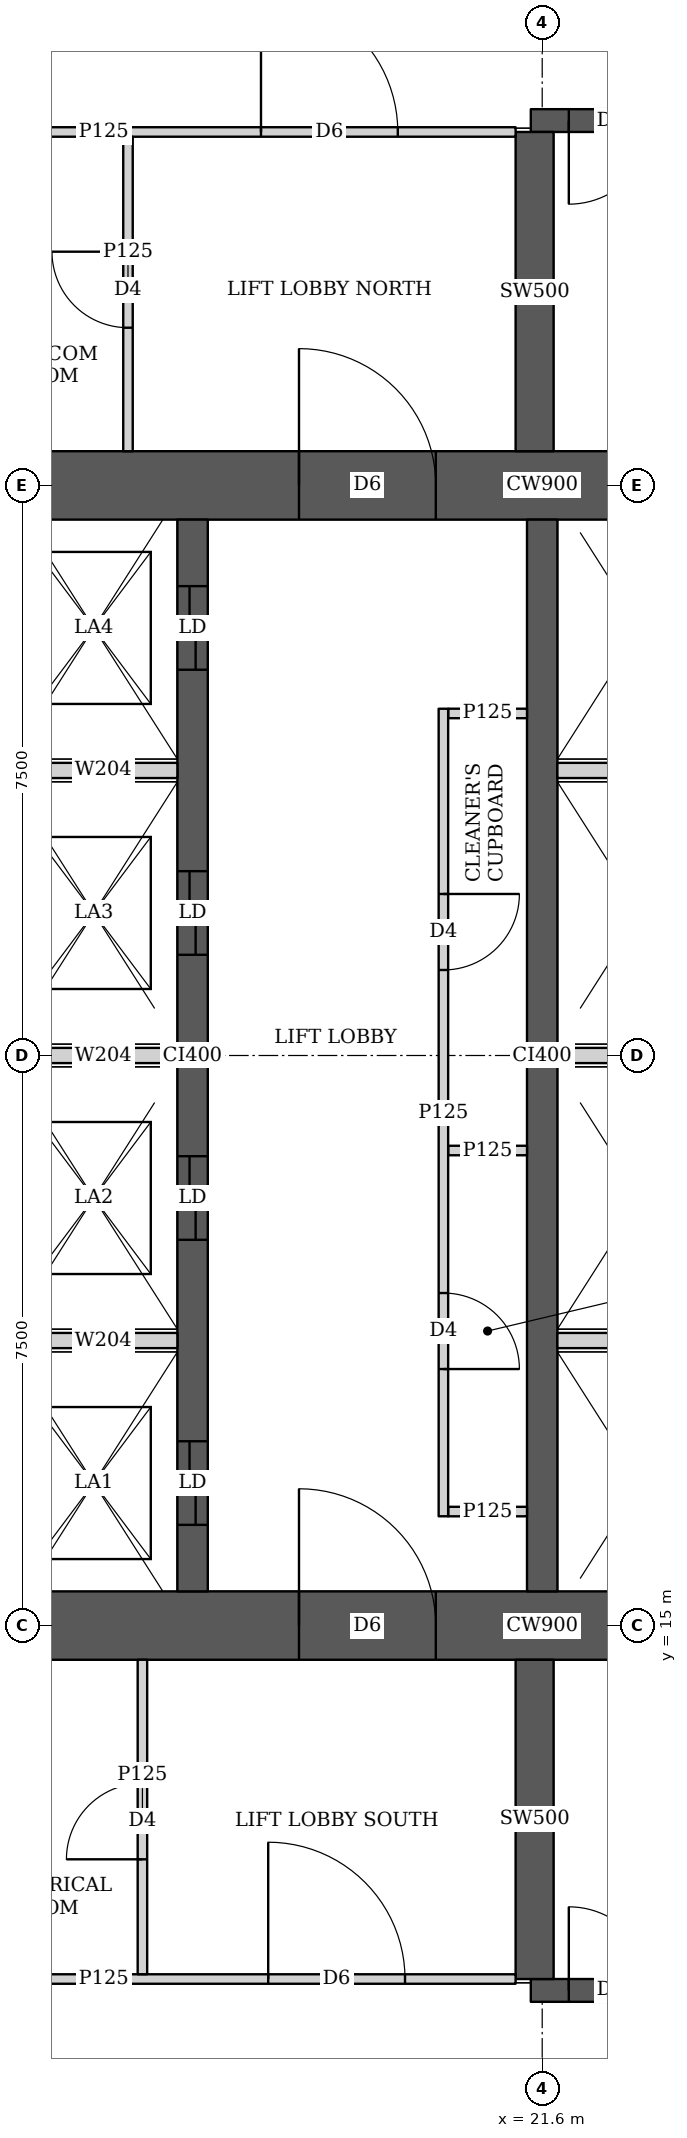
"""IFC4 building model, lengths in metres.
Left out: names, types, materials, properties, quantities, classifications, styles, units other than length and angle.
Written with IfcOpenShell. Run it as: python <this file> out.ifc"""

import sys

from ifc_helpers import new_model, si_unit, direction, frame, frame_2d, origin, place, context, subcontext, project, spatial, rectangle, extrude, element, fill, save


model = new_model("IFC4")
c1 = context("Model", 3, precision=1e-05, world=origin(), true_north=direction((0.0, 1.0)))
c2 = subcontext(c1, "Body", "Model", "MODEL_VIEW")
j1 = project(units=[si_unit("LENGTHUNIT", "METRE"), si_unit("PLANEANGLEUNIT", "RADIAN")], contexts=[c1])
p1 = place(None, origin())
s1 = spatial("IfcSite", under=j1, at=p1, CompositionType="ELEMENT")
p2 = place(p1, origin())
s2 = spatial("IfcBuilding", under=s1, at=p2, CompositionType="ELEMENT")
p3 = place(p2, frame((0.0, 0.0, 42.5)))
s3 = spatial("IfcBuildingStorey", under=s2, at=p3, CompositionType="ELEMENT", Elevation=42.5)
p4 = place(p3, frame((13.95, 15.0, 0.0), z_axis=(0.0, 0.0, 1.0), x_axis=(1.0, 0.0, 0.0)))
e1 = element("IfcWall", 1, at=p4, inside=s3, PredefinedType="SHEAR", context=c2, shape_type="SweptSolid", body=[
    extrude(rectangle(XDim=15.3, YDim=0.9, at=frame_2d((7.65, 0.0))), origin(), (0.0, 0.0, 1.0), 3.75),
])
p5 = place(p4, frame((4.45, 0.0, 0.0)))
e2 = element("IfcOpeningElement", 2, at=p5, cuts=e1, PredefinedType="OPENING", context=c2, shape_type="SweptSolid", body=[
    extrude(rectangle(XDim=1.8, YDim=2.1, at=frame_2d((0.9, 1.05))), frame((0.0, 0.46, 0.0), z_axis=(0.0, -1.0, 0.0), x_axis=(1.0, 0.0, 0.0)), (0.0, 0.0, 1.0), 0.92),
])
p6 = place(p4, frame((10.7, 0.0, 0.0)))
e3 = element("IfcOpeningElement", 3, at=p6, cuts=e1, PredefinedType="OPENING", context=c2, shape_type="SweptSolid", body=[
    extrude(rectangle(XDim=1.1, YDim=2.1, at=frame_2d((0.55, 1.05))), frame((0.0, 0.46, 0.0), z_axis=(0.0, -1.0, 0.0), x_axis=(1.0, 0.0, 0.0)), (0.0, 0.0, 1.0), 0.92),
])
p7 = place(p3, frame((13.95, 30.0, 0.0), z_axis=(0.0, 0.0, 1.0), x_axis=(1.0, 0.0, 0.0)))
e4 = element("IfcWall", 4, at=p7, inside=s3, PredefinedType="SHEAR", context=c2, shape_type="SweptSolid", body=[
    extrude(rectangle(XDim=15.3, YDim=0.9, at=frame_2d((7.65, 0.0))), origin(), (0.0, 0.0, 1.0), 3.75),
])
p8 = place(p7, frame((4.45, 0.0, 0.0)))
e5 = element("IfcOpeningElement", 5, at=p8, cuts=e4, PredefinedType="OPENING", context=c2, shape_type="SweptSolid", body=[
    extrude(rectangle(XDim=1.8, YDim=2.1, at=frame_2d((0.9, 1.05))), frame((0.0, 0.46, 0.0), z_axis=(0.0, -1.0, 0.0), x_axis=(1.0, 0.0, 0.0)), (0.0, 0.0, 1.0), 0.92),
])
p9 = place(p7, frame((10.7, 0.0, 0.0)))
e6 = element("IfcOpeningElement", 6, at=p9, cuts=e4, PredefinedType="OPENING", context=c2, shape_type="SweptSolid", body=[
    extrude(rectangle(XDim=1.1, YDim=2.1, at=frame_2d((0.55, 1.05))), frame((0.0, 0.46, 0.0), z_axis=(0.0, -1.0, 0.0), x_axis=(1.0, 0.0, 0.0)), (0.0, 0.0, 1.0), 0.92),
])
p10 = place(p3, frame((17.0, 15.45, 0.0), z_axis=(0.0, 0.0, 1.0), x_axis=(0.0, 1.0, 0.0)))
e7 = element("IfcWall", 7, at=p10, inside=s3, PredefinedType="SHEAR", context=c2, shape_type="SweptSolid", body=[
    extrude(rectangle(XDim=14.1, YDim=0.4, at=frame_2d((7.05, 0.0))), origin(), (0.0, 0.0, 1.0), 3.75),
])
p11 = place(p10, frame((0.875, 0.0, 0.0)))
e8 = element("IfcOpeningElement", 8, at=p11, cuts=e7, PredefinedType="OPENING", context=c2, shape_type="SweptSolid", body=[
    extrude(rectangle(XDim=1.1, YDim=2.1, at=frame_2d((0.55, 1.05))), frame((0.0, 0.21, 0.0), z_axis=(0.0, -1.0, 0.0), x_axis=(1.0, 0.0, 0.0)), (0.0, 0.0, 1.0), 0.42),
])
p12 = place(p10, frame((4.625, 0.0, 0.0)))
e9 = element("IfcOpeningElement", 9, at=p12, cuts=e7, PredefinedType="OPENING", context=c2, shape_type="SweptSolid", body=[
    extrude(rectangle(XDim=1.1, YDim=2.1, at=frame_2d((0.55, 1.05))), frame((0.0, 0.21, 0.0), z_axis=(0.0, -1.0, 0.0), x_axis=(1.0, 0.0, 0.0)), (0.0, 0.0, 1.0), 0.42),
])
p13 = place(p10, frame((8.375, 0.0, 0.0)))
e10 = element("IfcOpeningElement", 10, at=p13, cuts=e7, PredefinedType="OPENING", context=c2, shape_type="SweptSolid", body=[
    extrude(rectangle(XDim=1.1, YDim=2.1, at=frame_2d((0.55, 1.05))), frame((0.0, 0.21, 0.0), z_axis=(0.0, -1.0, 0.0), x_axis=(1.0, 0.0, 0.0)), (0.0, 0.0, 1.0), 0.42),
])
p14 = place(p10, frame((12.125, 0.0, 0.0)))
e11 = element("IfcOpeningElement", 11, at=p14, cuts=e7, PredefinedType="OPENING", context=c2, shape_type="SweptSolid", body=[
    extrude(rectangle(XDim=1.1, YDim=2.1, at=frame_2d((0.55, 1.05))), frame((0.0, 0.21, 0.0), z_axis=(0.0, -1.0, 0.0), x_axis=(1.0, 0.0, 0.0)), (0.0, 0.0, 1.0), 0.42),
])
p15 = place(p3, frame((21.6, 15.45, 0.0), z_axis=(0.0, 0.0, 1.0), x_axis=(0.0, 1.0, 0.0)))
e12 = element("IfcWall", 12, at=p15, inside=s3, PredefinedType="SHEAR", context=c2, shape_type="SweptSolid", body=[
    extrude(rectangle(XDim=14.1, YDim=0.4, at=frame_2d((7.05, 0.0))), origin(), (0.0, 0.0, 1.0), 3.75),
])
p16 = place(p3, frame((21.45, 10.2, 0.0), z_axis=(0.0, 0.0, 1.0), x_axis=(1.0, 0.0, 0.0)))
e13 = element("IfcWall", 13, at=p16, inside=s3, PredefinedType="SHEAR", context=c2, shape_type="SweptSolid", body=[
    extrude(rectangle(XDim=7.5, YDim=0.3, at=frame_2d((3.75, 0.0))), origin(), (0.0, 0.0, 1.0), 3.75),
])
p17 = place(p16, frame((0.5, 0.0, 0.0)))
e14 = element("IfcOpeningElement", 14, at=p17, cuts=e13, PredefinedType="OPENING", context=c2, shape_type="SweptSolid", body=[
    extrude(rectangle(XDim=1.1, YDim=2.1, at=frame_2d((0.55, 1.05))), frame((0.0, 0.16, 0.0), z_axis=(0.0, -1.0, 0.0), x_axis=(1.0, 0.0, 0.0)), (0.0, 0.0, 1.0), 0.32),
])
p18 = place(p3, frame((21.5, 10.35, 0.0), z_axis=(0.0, 0.0, 1.0), x_axis=(0.0, 1.0, 0.0)))
e15 = element("IfcWall", 15, at=p18, inside=s3, PredefinedType="SHEAR", context=c2, shape_type="SweptSolid", body=[
    extrude(rectangle(XDim=4.2, YDim=0.5, at=frame_2d((2.1, 0.0))), origin(), (0.0, 0.0, 1.0), 3.75),
])
p19 = place(p3, frame((21.45, 34.8, 0.0), z_axis=(0.0, 0.0, 1.0), x_axis=(1.0, 0.0, 0.0)))
e16 = element("IfcWall", 16, at=p19, inside=s3, PredefinedType="SHEAR", context=c2, shape_type="SweptSolid", body=[
    extrude(rectangle(XDim=7.5, YDim=0.3, at=frame_2d((3.75, 0.0))), origin(), (0.0, 0.0, 1.0), 3.75),
])
p20 = place(p19, frame((0.5, 0.0, 0.0)))
e17 = element("IfcOpeningElement", 17, at=p20, cuts=e16, PredefinedType="OPENING", context=c2, shape_type="SweptSolid", body=[
    extrude(rectangle(XDim=1.1, YDim=2.1, at=frame_2d((0.55, 1.05))), frame((0.0, 0.16, 0.0), z_axis=(0.0, -1.0, 0.0), x_axis=(1.0, 0.0, 0.0)), (0.0, 0.0, 1.0), 0.32),
])
p21 = place(p3, frame((21.5, 30.45, 0.0), z_axis=(0.0, 0.0, 1.0), x_axis=(0.0, 1.0, 0.0)))
e18 = element("IfcWall", 18, at=p21, inside=s3, PredefinedType="SHEAR", context=c2, shape_type="SweptSolid", body=[
    extrude(rectangle(XDim=4.2, YDim=0.5, at=frame_2d((2.1, 0.0))), origin(), (0.0, 0.0, 1.0), 3.75),
])
p22 = place(p3, frame((10.413, 10.35, 0.0), z_axis=(0.0, 0.0, 1.0), x_axis=(1.0, 0.0, 0.0)))
e19 = element("IfcWall", 19, at=p22, inside=s3, PredefinedType="PARTITIONING", context=c2, shape_type="SweptSolid", body=[
    extrude(rectangle(XDim=10.837, YDim=0.125, at=frame_2d((5.418, 0.0))), origin(), (0.0, 0.0, 1.0), 3.5),
])
p23 = place(p22, frame((7.582, 0.0, 0.0)))
e20 = element("IfcOpeningElement", 20, at=p23, cuts=e19, PredefinedType="OPENING", context=c2, shape_type="SweptSolid", body=[
    extrude(rectangle(XDim=1.8, YDim=2.1, at=frame_2d((0.9, 1.05))), frame((0.0, 0.073, 0.0), z_axis=(0.0, -1.0, 0.0), x_axis=(1.0, 0.0, 0.0)), (0.0, 0.0, 1.0), 0.145),
])
p24 = place(p3, frame((10.413, 34.65, 0.0), z_axis=(0.0, 0.0, 1.0), x_axis=(1.0, 0.0, 0.0)))
e21 = element("IfcWall", 21, at=p24, inside=s3, PredefinedType="PARTITIONING", context=c2, shape_type="SweptSolid", body=[
    extrude(rectangle(XDim=10.837, YDim=0.125, at=frame_2d((5.418, 0.0))), origin(), (0.0, 0.0, 1.0), 3.5),
])
p25 = place(p24, frame((7.487, 0.0, 0.0)))
e22 = element("IfcOpeningElement", 22, at=p25, cuts=e21, PredefinedType="OPENING", context=c2, shape_type="SweptSolid", body=[
    extrude(rectangle(XDim=1.8, YDim=2.1, at=frame_2d((0.9, 1.05))), frame((0.0, 0.073, 0.0), z_axis=(0.0, -1.0, 0.0), x_axis=(1.0, 0.0, 0.0)), (0.0, 0.0, 1.0), 0.145),
])
p26 = place(p3, frame((16.34, 10.413, 0.0), z_axis=(0.0, 0.0, 1.0), x_axis=(0.0, 1.0, 0.0)))
e23 = element("IfcWall", 23, at=p26, inside=s3, PredefinedType="PARTITIONING", context=c2, shape_type="SweptSolid", body=[
    extrude(rectangle(XDim=4.137, YDim=0.125, at=frame_2d((2.068, 0.0))), origin(), (0.0, 0.0, 1.0), 3.5),
])
p27 = place(p26, frame((1.512, 0.0, 0.0)))
e24 = element("IfcOpeningElement", 24, at=p27, cuts=e23, PredefinedType="OPENING", context=c2, shape_type="SweptSolid", body=[
    extrude(rectangle(XDim=1.0, YDim=2.1, at=frame_2d((0.5, 1.05))), frame((0.0, 0.073, 0.0), z_axis=(0.0, -1.0, 0.0), x_axis=(1.0, 0.0, 0.0)), (0.0, 0.0, 1.0), 0.145),
])
p28 = place(p3, frame((16.15, 30.45, 0.0), z_axis=(0.0, 0.0, 1.0), x_axis=(0.0, 1.0, 0.0)))
e25 = element("IfcWall", 25, at=p28, inside=s3, PredefinedType="PARTITIONING", context=c2, shape_type="SweptSolid", body=[
    extrude(rectangle(XDim=4.137, YDim=0.125, at=frame_2d((2.068, 0.0))), origin(), (0.0, 0.0, 1.0), 3.5),
])
p29 = place(p28, frame((1.625, 0.0, 0.0)))
e26 = element("IfcOpeningElement", 26, at=p29, cuts=e25, PredefinedType="OPENING", context=c2, shape_type="SweptSolid", body=[
    extrude(rectangle(XDim=1.0, YDim=2.1, at=frame_2d((0.5, 1.05))), frame((0.0, 0.073, 0.0), z_axis=(0.0, -1.0, 0.0), x_axis=(1.0, 0.0, 0.0)), (0.0, 0.0, 1.0), 0.145),
])
p30 = place(p3, frame((20.3, 16.438, 0.0), z_axis=(0.0, 0.0, 1.0), x_axis=(0.0, 1.0, 0.0)))
e27 = element("IfcWall", 27, at=p30, inside=s3, PredefinedType="PARTITIONING", context=c2, shape_type="SweptSolid", body=[
    extrude(rectangle(XDim=10.624, YDim=0.125, at=frame_2d((5.312, 0.0))), origin(), (0.0, 0.0, 1.0), 3.5),
])
p31 = place(p30, frame((1.937, 0.0, 0.0)))
e28 = element("IfcOpeningElement", 28, at=p31, cuts=e27, PredefinedType="OPENING", context=c2, shape_type="SweptSolid", body=[
    extrude(rectangle(XDim=1.0, YDim=2.1, at=frame_2d((0.5, 1.05))), frame((0.0, 0.073, 0.0), z_axis=(0.0, -1.0, 0.0), x_axis=(1.0, 0.0, 0.0)), (0.0, 0.0, 1.0), 0.145),
])
p32 = place(p30, frame((7.187, 0.0, 0.0)))
e29 = element("IfcOpeningElement", 29, at=p32, cuts=e27, PredefinedType="OPENING", context=c2, shape_type="SweptSolid", body=[
    extrude(rectangle(XDim=1.0, YDim=2.1, at=frame_2d((0.5, 1.05))), frame((0.0, 0.073, 0.0), z_axis=(0.0, -1.0, 0.0), x_axis=(1.0, 0.0, 0.0)), (0.0, 0.0, 1.0), 0.145),
])
for number, where, z_axis, x_axis in (
    (30, (20.363, 16.5, 0.0), (0.0, 0.0, 1.0), (1.0, 0.0, 0.0)),
    (31, (20.363, 27.0, 0.0), (0.0, 0.0, 1.0), (1.0, 0.0, 0.0)),
    (32, (20.363, 21.25, 0.0), (0.0, 0.0, 1.0), (1.0, 0.0, 0.0)),
):
    element("IfcWall", number, at=place(p3, frame(where, z_axis=z_axis, x_axis=x_axis)), inside=s3, PredefinedType="PARTITIONING", context=c2, shape_type="SweptSolid", body=[
        extrude(rectangle(XDim=1.037, YDim=0.125, at=frame_2d((0.519, 0.0))), origin(), (0.0, 0.0, 1.0), 3.5),
    ])
p33 = place(p3, frame((14.85, 18.75, 0.0), z_axis=(0.0, 0.0, 1.0), x_axis=(1.0, 0.0, 0.0)))
e33 = element("IfcWall", 33, at=p33, inside=s3, PredefinedType="SOLIDWALL", context=c2, shape_type="SweptSolid", body=[
    extrude(rectangle(XDim=1.95, YDim=0.2, at=frame_2d((0.975, 0.0))), origin(), (0.0, 0.0, 1.0), 3.5),
])
p34 = place(p3, frame((21.8, 18.75, 0.0), z_axis=(0.0, 0.0, 1.0), x_axis=(1.0, 0.0, 0.0)))
e34 = element("IfcWall", 34, at=p34, inside=s3, PredefinedType="SOLIDWALL", context=c2, shape_type="SweptSolid", body=[
    extrude(rectangle(XDim=2.2, YDim=0.2, at=frame_2d((1.1, 0.0))), origin(), (0.0, 0.0, 1.0), 3.5),
])
p35 = place(p3, frame((14.85, 22.5, 0.0), z_axis=(0.0, 0.0, 1.0), x_axis=(1.0, 0.0, 0.0)))
e35 = element("IfcWall", 35, at=p35, inside=s3, PredefinedType="SOLIDWALL", context=c2, shape_type="SweptSolid", body=[
    extrude(rectangle(XDim=1.95, YDim=0.2, at=frame_2d((0.975, 0.0))), origin(), (0.0, 0.0, 1.0), 3.5),
])
p36 = place(p3, frame((21.8, 22.5, 0.0), z_axis=(0.0, 0.0, 1.0), x_axis=(1.0, 0.0, 0.0)))
e36 = element("IfcWall", 36, at=p36, inside=s3, PredefinedType="SOLIDWALL", context=c2, shape_type="SweptSolid", body=[
    extrude(rectangle(XDim=2.2, YDim=0.2, at=frame_2d((1.1, 0.0))), origin(), (0.0, 0.0, 1.0), 3.5),
])
p37 = place(p3, frame((14.85, 26.25, 0.0), z_axis=(0.0, 0.0, 1.0), x_axis=(1.0, 0.0, 0.0)))
e37 = element("IfcWall", 37, at=p37, inside=s3, PredefinedType="SOLIDWALL", context=c2, shape_type="SweptSolid", body=[
    extrude(rectangle(XDim=1.95, YDim=0.2, at=frame_2d((0.975, 0.0))), origin(), (0.0, 0.0, 1.0), 3.5),
])
p38 = place(p3, frame((21.8, 26.25, 0.0), z_axis=(0.0, 0.0, 1.0), x_axis=(1.0, 0.0, 0.0)))
e38 = element("IfcWall", 38, at=p38, inside=s3, PredefinedType="SOLIDWALL", context=c2, shape_type="SweptSolid", body=[
    extrude(rectangle(XDim=2.2, YDim=0.2, at=frame_2d((1.1, 0.0))), origin(), (0.0, 0.0, 1.0), 3.5),
])
p39 = place(p27, origin())
e39 = element("IfcDoor", 39, at=p39, inside=s3, OperationType="SINGLE_SWING_LEFT", PredefinedType="DOOR", context=c2, shape_type="SweptSolid", body=[
    extrude(rectangle(XDim=1.0, YDim=2.1, at=frame_2d((0.5, 1.05))), frame((0.0, 0.025, 0.0), z_axis=(0.0, -1.0, 0.0), x_axis=(1.0, 0.0, 0.0)), (0.0, 0.0, 1.0), 0.05),
])
fill(e24, e39)
p40 = place(p23, origin())
e40 = element("IfcDoor", 40, at=p40, inside=s3, OperationType="DOUBLE_DOOR_SINGLE_SWING", PredefinedType="DOOR", context=c2, shape_type="SweptSolid", body=[
    extrude(rectangle(XDim=1.8, YDim=2.1, at=frame_2d((0.9, 1.05))), frame((0.0, 0.025, 0.0), z_axis=(0.0, -1.0, 0.0), x_axis=(1.0, 0.0, 0.0)), (0.0, 0.0, 1.0), 0.05),
])
fill(e20, e40)
p41 = place(p29, origin())
e41 = element("IfcDoor", 41, at=p41, inside=s3, OperationType="SINGLE_SWING_RIGHT", PredefinedType="DOOR", context=c2, shape_type="SweptSolid", body=[
    extrude(rectangle(XDim=1.0, YDim=2.1, at=frame_2d((0.5, 1.05))), frame((0.0, 0.025, 0.0), z_axis=(0.0, -1.0, 0.0), x_axis=(1.0, 0.0, 0.0)), (0.0, 0.0, 1.0), 0.05),
])
fill(e26, e41)
p42 = place(p25, origin())
e42 = element("IfcDoor", 42, at=p42, inside=s3, OperationType="DOUBLE_DOOR_SINGLE_SWING", PredefinedType="DOOR", context=c2, shape_type="SweptSolid", body=[
    extrude(rectangle(XDim=1.8, YDim=2.1, at=frame_2d((0.9, 1.05))), frame((0.0, 0.025, 0.0), z_axis=(0.0, -1.0, 0.0), x_axis=(1.0, 0.0, 0.0)), (0.0, 0.0, 1.0), 0.05),
])
fill(e22, e42)
p43 = place(p31, origin())
e43 = element("IfcDoor", 43, at=p43, inside=s3, OperationType="SINGLE_SWING_RIGHT", PredefinedType="DOOR", context=c2, shape_type="SweptSolid", body=[
    extrude(rectangle(XDim=1.0, YDim=2.1, at=frame_2d((0.5, 1.05))), frame((0.0, 0.025, 0.0), z_axis=(0.0, -1.0, 0.0), x_axis=(1.0, 0.0, 0.0)), (0.0, 0.0, 1.0), 0.05),
])
fill(e28, e43)
p44 = place(p32, origin())
e44 = element("IfcDoor", 44, at=p44, inside=s3, OperationType="SINGLE_SWING_LEFT", PredefinedType="DOOR", context=c2, shape_type="SweptSolid", body=[
    extrude(rectangle(XDim=1.0, YDim=2.1, at=frame_2d((0.5, 1.05))), frame((0.0, 0.025, 0.0), z_axis=(0.0, -1.0, 0.0), x_axis=(1.0, 0.0, 0.0)), (0.0, 0.0, 1.0), 0.05),
])
fill(e29, e44)
p45 = place(p5, origin())
e45 = element("IfcDoor", 45, at=p45, inside=s3, OperationType="DOUBLE_DOOR_SINGLE_SWING", PredefinedType="DOOR", context=c2, shape_type="SweptSolid", body=[
    extrude(rectangle(XDim=1.8, YDim=2.1, at=frame_2d((0.9, 1.05))), frame((0.0, 0.025, 0.0), z_axis=(0.0, -1.0, 0.0), x_axis=(1.0, 0.0, 0.0)), (0.0, 0.0, 1.0), 0.05),
])
fill(e2, e45)
p46 = place(p8, origin())
e46 = element("IfcDoor", 46, at=p46, inside=s3, OperationType="DOUBLE_DOOR_SINGLE_SWING", PredefinedType="DOOR", context=c2, shape_type="SweptSolid", body=[
    extrude(rectangle(XDim=1.8, YDim=2.1, at=frame_2d((0.9, 1.05))), frame((0.0, 0.025, 0.0), z_axis=(0.0, -1.0, 0.0), x_axis=(1.0, 0.0, 0.0)), (0.0, 0.0, 1.0), 0.05),
])
fill(e5, e46)
p47 = place(p11, origin())
e47 = element("IfcDoor", 47, at=p47, inside=s3, OperationType="DOUBLE_DOOR_SLIDING", PredefinedType="DOOR", context=c2, shape_type="SweptSolid", body=[
    extrude(rectangle(XDim=1.1, YDim=2.1, at=frame_2d((0.55, 1.05))), frame((0.0, 0.025, 0.0), z_axis=(0.0, -1.0, 0.0), x_axis=(1.0, 0.0, 0.0)), (0.0, 0.0, 1.0), 0.05),
])
fill(e8, e47)
p48 = place(p12, origin())
e48 = element("IfcDoor", 48, at=p48, inside=s3, OperationType="DOUBLE_DOOR_SLIDING", PredefinedType="DOOR", context=c2, shape_type="SweptSolid", body=[
    extrude(rectangle(XDim=1.1, YDim=2.1, at=frame_2d((0.55, 1.05))), frame((0.0, 0.025, 0.0), z_axis=(0.0, -1.0, 0.0), x_axis=(1.0, 0.0, 0.0)), (0.0, 0.0, 1.0), 0.05),
])
fill(e9, e48)
p49 = place(p13, origin())
e49 = element("IfcDoor", 49, at=p49, inside=s3, OperationType="DOUBLE_DOOR_SLIDING", PredefinedType="DOOR", context=c2, shape_type="SweptSolid", body=[
    extrude(rectangle(XDim=1.1, YDim=2.1, at=frame_2d((0.55, 1.05))), frame((0.0, 0.025, 0.0), z_axis=(0.0, -1.0, 0.0), x_axis=(1.0, 0.0, 0.0)), (0.0, 0.0, 1.0), 0.05),
])
fill(e10, e49)
p50 = place(p14, origin())
e50 = element("IfcDoor", 50, at=p50, inside=s3, OperationType="DOUBLE_DOOR_SLIDING", PredefinedType="DOOR", context=c2, shape_type="SweptSolid", body=[
    extrude(rectangle(XDim=1.1, YDim=2.1, at=frame_2d((0.55, 1.05))), frame((0.0, 0.025, 0.0), z_axis=(0.0, -1.0, 0.0), x_axis=(1.0, 0.0, 0.0)), (0.0, 0.0, 1.0), 0.05),
])
fill(e11, e50)
p51 = place(p17, origin())
e51 = element("IfcDoor", 51, at=p51, inside=s3, OperationType="SINGLE_SWING_LEFT", PredefinedType="DOOR", context=c2, shape_type="SweptSolid", body=[
    extrude(rectangle(XDim=1.1, YDim=2.1, at=frame_2d((0.55, 1.05))), frame((0.0, 0.025, 0.0), z_axis=(0.0, -1.0, 0.0), x_axis=(1.0, 0.0, 0.0)), (0.0, 0.0, 1.0), 0.05),
])
fill(e14, e51)
p52 = place(p20, origin())
e52 = element("IfcDoor", 52, at=p52, inside=s3, OperationType="SINGLE_SWING_RIGHT", PredefinedType="DOOR", context=c2, shape_type="SweptSolid", body=[
    extrude(rectangle(XDim=1.1, YDim=2.1, at=frame_2d((0.55, 1.05))), frame((0.0, 0.025, 0.0), z_axis=(0.0, -1.0, 0.0), x_axis=(1.0, 0.0, 0.0)), (0.0, 0.0, 1.0), 0.05),
])
fill(e17, e52)
save(model, sys.argv[1])
